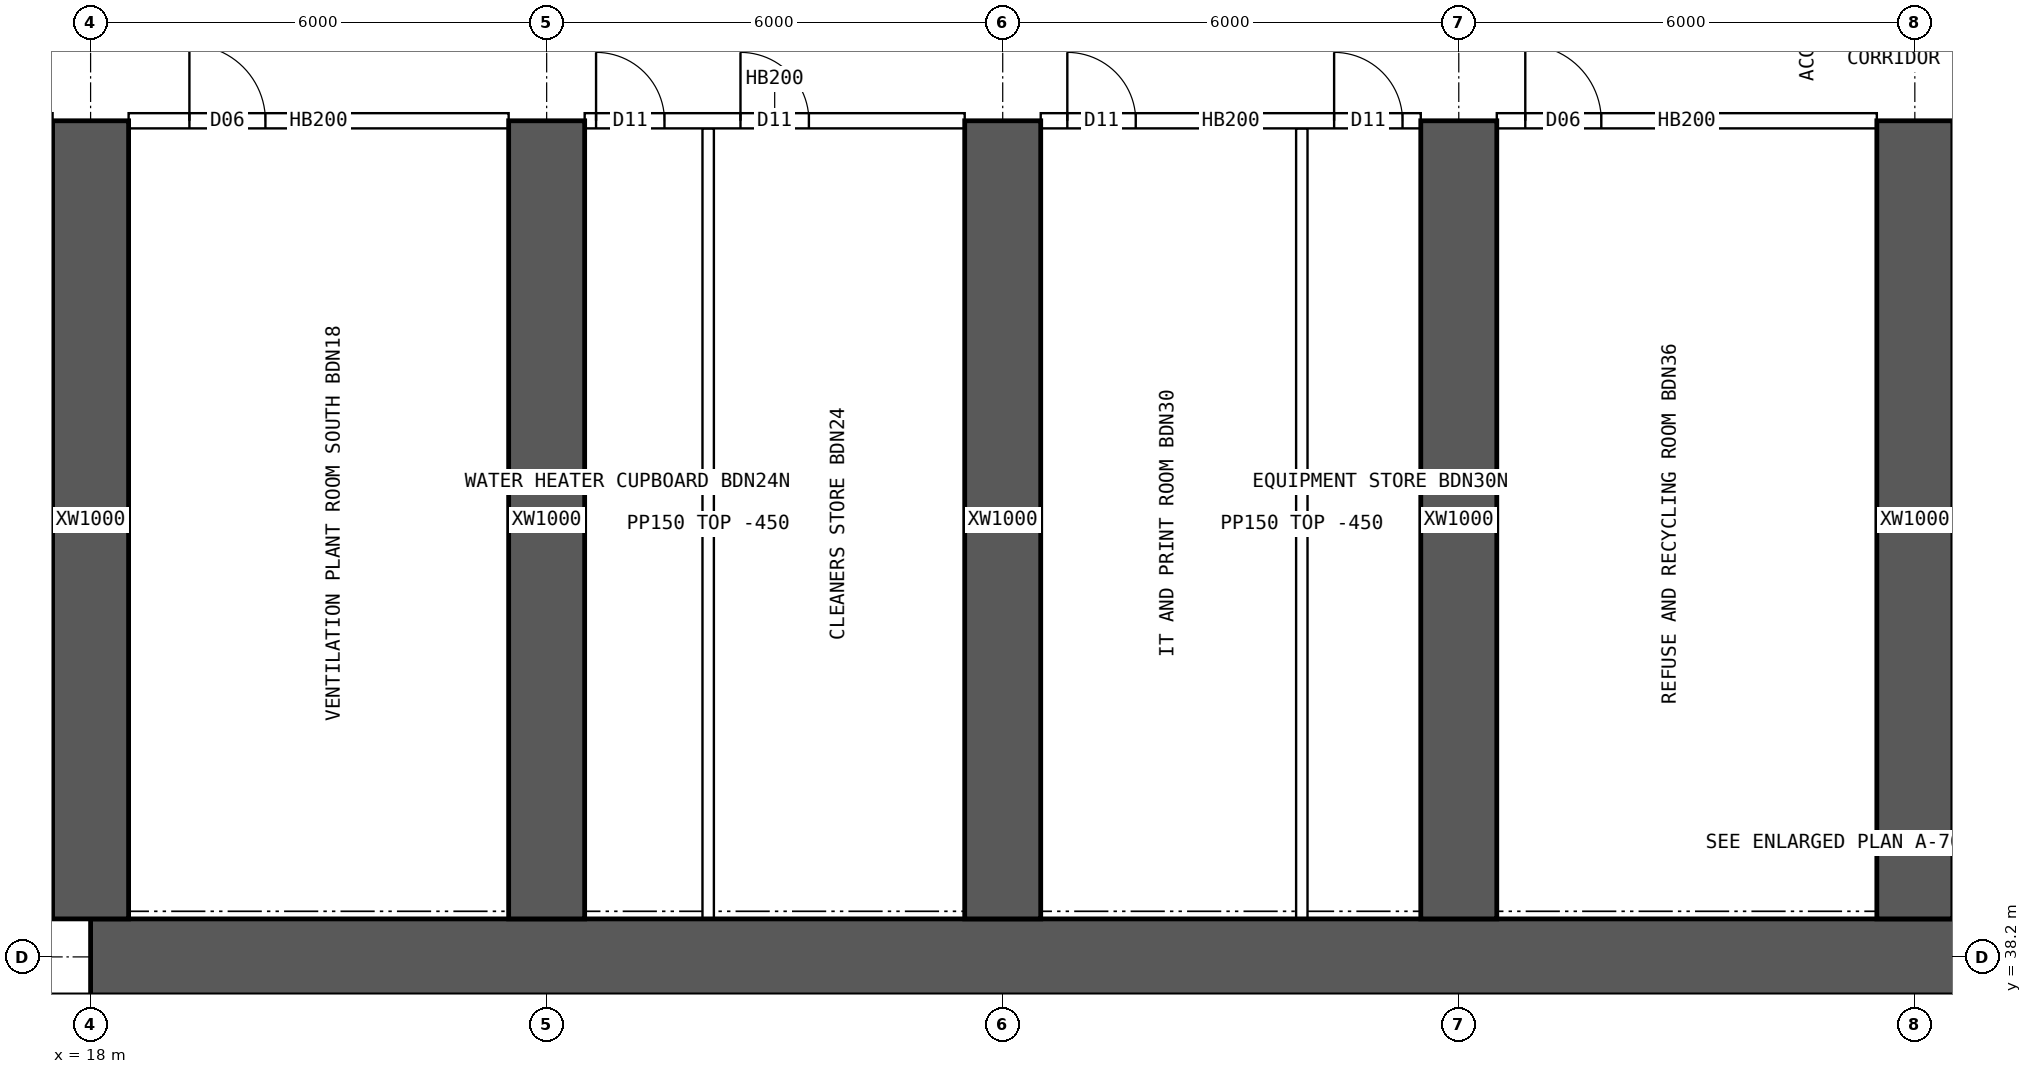
"""IFC4 building model, lengths in metres.
Left out: names, types, materials, properties, quantities, classifications, styles, units other than length and angle.
Written with IfcOpenShell. Run it as: python <this file> out.ifc"""

import sys

from ifc_helpers import new_model, si_unit, direction, frame, frame_2d, origin, place, context, subcontext, project, spatial, rectangle, extrude, element, fill, save


model = new_model("IFC4")
c1 = context("Model", 3, precision=1e-05, world=origin(), true_north=direction((0.0, 1.0)))
c2 = subcontext(c1, "Body", "Model", "MODEL_VIEW")
j1 = project(units=[si_unit("LENGTHUNIT", "METRE"), si_unit("PLANEANGLEUNIT", "RADIAN")], contexts=[c1])
p1 = place(None, origin())
s1 = spatial("IfcSite", under=j1, at=p1, CompositionType="ELEMENT")
p2 = place(p1, origin())
s2 = spatial("IfcBuilding", under=s1, at=p2, CompositionType="ELEMENT")
p3 = place(p2, frame((0.0, 0.0, 20.2)))
s3 = spatial("IfcBuildingStorey", under=s2, at=p3, CompositionType="ELEMENT", Elevation=20.2)
p4 = place(p3, frame((18.0, 38.2, 0.0), z_axis=(0.0, 0.0, 1.0), x_axis=(1.0, 0.0, 0.0)))
e1 = element("IfcWall", 1, at=p4, inside=s3, PredefinedType="SHEAR", context=c2, shape_type="SweptSolid", body=[
    extrude(rectangle(XDim=48.0, YDim=1.0, at=frame_2d((24.0, 0.0))), origin(), (0.0, 0.0, 1.0), 3.75),
])
for number, where, z_axis, x_axis in (
    (2, (21.6, 34.75, 0.0), (0.0, 0.0, 1.0), (0.0, 1.0, 0.0)),
    (3, (26.0, 34.75, 0.0), (0.0, 0.0, 1.0), (0.0, 1.0, 0.0)),
):
    element("IfcWall", number, at=place(p3, frame(where, z_axis=z_axis, x_axis=x_axis)), inside=s3, PredefinedType="SHEAR", context=c2, shape_type="SweptSolid", body=[
        extrude(rectangle(XDim=2.95, YDim=0.3, at=frame_2d((1.475, 0.0))), origin(), (0.0, 0.0, 1.0), 3.75),
    ])
for number, where, z_axis, x_axis in (
    (4, (18.0, 38.7, 0.0), (0.0, 0.0, 1.0), (0.0, 1.0, 0.0)),
    (5, (24.0, 38.7, 0.0), (0.0, 0.0, 1.0), (0.0, 1.0, 0.0)),
    (6, (30.0, 38.7, 0.0), (0.0, 0.0, 1.0), (0.0, 1.0, 0.0)),
    (7, (36.0, 38.7, 0.0), (0.0, 0.0, 1.0), (0.0, 1.0, 0.0)),
    (8, (42.0, 38.7, 0.0), (0.0, 0.0, 1.0), (0.0, 1.0, 0.0)),
):
    element("IfcWall", number, at=place(p3, frame(where, z_axis=z_axis, x_axis=x_axis)), inside=s3, PredefinedType="SHEAR", context=c2, shape_type="SweptSolid", body=[
        extrude(rectangle(XDim=10.5, YDim=1.0, at=frame_2d((5.25, 0.0))), origin(), (0.0, 0.0, 1.0), 3.75),
    ])
for number, where, z_axis, x_axis in (
    (9, (29.651, 34.75, 0.0), (0.0, 0.0, 1.0), (0.0, 1.0, 0.0)),
    (10, (33.946, 34.75, 0.0), (0.0, 0.0, 1.0), (0.0, 1.0, 0.0)),
    (11, (36.946, 34.75, 0.0), (0.0, 0.0, 1.0), (0.0, 1.0, 0.0)),
    (12, (41.463, 34.75, 0.0), (0.0, 0.0, 1.0), (0.0, 1.0, 0.0)),
):
    element("IfcWall", number, at=place(p3, frame(where, z_axis=z_axis, x_axis=x_axis)), inside=s3, PredefinedType="SOLIDWALL", context=c2, shape_type="SweptSolid", body=[
        extrude(rectangle(XDim=2.95, YDim=0.15, at=frame_2d((1.475, 0.0))), origin(), (0.0, 0.0, 1.0), 3.3),
    ])
p5 = place(p3, frame((18.5, 49.2, 0.0), z_axis=(0.0, 0.0, 1.0), x_axis=(1.0, 0.0, 0.0)))
e13 = element("IfcWall", 13, at=p5, inside=s3, PredefinedType="SOLIDWALL", context=c2, shape_type="SweptSolid", body=[
    extrude(rectangle(XDim=5.0, YDim=0.2, at=frame_2d((2.5, 0.0))), origin(), (0.0, 0.0, 1.0), 3.3),
])
p6 = place(p5, frame((0.8, 0.0, 0.0)))
e14 = element("IfcOpeningElement", 14, at=p6, cuts=e13, PredefinedType="OPENING", context=c2, shape_type="SweptSolid", body=[
    extrude(rectangle(XDim=1.0, YDim=2.1, at=frame_2d((0.5, 1.05))), frame((0.0, 0.11, 0.0), z_axis=(0.0, -1.0, 0.0), x_axis=(1.0, 0.0, 0.0)), (0.0, 0.0, 1.0), 0.22),
])
p7 = place(p3, frame((24.5, 49.2, 0.0), z_axis=(0.0, 0.0, 1.0), x_axis=(1.0, 0.0, 0.0)))
e15 = element("IfcWall", 15, at=p7, inside=s3, PredefinedType="SOLIDWALL", context=c2, shape_type="SweptSolid", body=[
    extrude(rectangle(XDim=5.0, YDim=0.2, at=frame_2d((2.5, 0.0))), origin(), (0.0, 0.0, 1.0), 3.3),
])
p8 = place(p7, frame((0.15, 0.0, 0.0)))
e16 = element("IfcOpeningElement", 16, at=p8, cuts=e15, PredefinedType="OPENING", context=c2, shape_type="SweptSolid", body=[
    extrude(rectangle(XDim=0.9, YDim=2.1, at=frame_2d((0.45, 1.05))), frame((0.0, 0.11, 0.0), z_axis=(0.0, -1.0, 0.0), x_axis=(1.0, 0.0, 0.0)), (0.0, 0.0, 1.0), 0.22),
])
p9 = place(p7, frame((2.05, 0.0, 0.0)))
e17 = element("IfcOpeningElement", 17, at=p9, cuts=e15, PredefinedType="OPENING", context=c2, shape_type="SweptSolid", body=[
    extrude(rectangle(XDim=0.9, YDim=2.1, at=frame_2d((0.45, 1.05))), frame((0.0, 0.11, 0.0), z_axis=(0.0, -1.0, 0.0), x_axis=(1.0, 0.0, 0.0)), (0.0, 0.0, 1.0), 0.22),
])
p10 = place(p3, frame((30.5, 49.2, 0.0), z_axis=(0.0, 0.0, 1.0), x_axis=(1.0, 0.0, 0.0)))
e18 = element("IfcWall", 18, at=p10, inside=s3, PredefinedType="SOLIDWALL", context=c2, shape_type="SweptSolid", body=[
    extrude(rectangle(XDim=5.0, YDim=0.2, at=frame_2d((2.5, 0.0))), origin(), (0.0, 0.0, 1.0), 3.3),
])
p11 = place(p10, frame((0.35, 0.0, 0.0)))
e19 = element("IfcOpeningElement", 19, at=p11, cuts=e18, PredefinedType="OPENING", context=c2, shape_type="SweptSolid", body=[
    extrude(rectangle(XDim=0.9, YDim=2.1, at=frame_2d((0.45, 1.05))), frame((0.0, 0.11, 0.0), z_axis=(0.0, -1.0, 0.0), x_axis=(1.0, 0.0, 0.0)), (0.0, 0.0, 1.0), 0.22),
])
p12 = place(p10, frame((3.86, 0.0, 0.0)))
e20 = element("IfcOpeningElement", 20, at=p12, cuts=e18, PredefinedType="OPENING", context=c2, shape_type="SweptSolid", body=[
    extrude(rectangle(XDim=0.9, YDim=2.1, at=frame_2d((0.45, 1.05))), frame((0.0, 0.11, 0.0), z_axis=(0.0, -1.0, 0.0), x_axis=(1.0, 0.0, 0.0)), (0.0, 0.0, 1.0), 0.22),
])
p13 = place(p3, frame((36.5, 49.2, 0.0), z_axis=(0.0, 0.0, 1.0), x_axis=(1.0, 0.0, 0.0)))
e21 = element("IfcWall", 21, at=p13, inside=s3, PredefinedType="SOLIDWALL", context=c2, shape_type="SweptSolid", body=[
    extrude(rectangle(XDim=5.0, YDim=0.2, at=frame_2d((2.5, 0.0))), origin(), (0.0, 0.0, 1.0), 3.3),
])
p14 = place(p13, frame((0.375, 0.0, 0.0)))
e22 = element("IfcOpeningElement", 22, at=p14, cuts=e21, PredefinedType="OPENING", context=c2, shape_type="SweptSolid", body=[
    extrude(rectangle(XDim=1.0, YDim=2.1, at=frame_2d((0.5, 1.05))), frame((0.0, 0.11, 0.0), z_axis=(0.0, -1.0, 0.0), x_axis=(1.0, 0.0, 0.0)), (0.0, 0.0, 1.0), 0.22),
])
for number, where, z_axis, x_axis in (
    (23, (26.125, 38.7, 0.0), (0.0, 0.0, 1.0), (0.0, 1.0, 0.0)),
    (24, (33.935, 38.7, 0.0), (0.0, 0.0, 1.0), (0.0, 1.0, 0.0)),
):
    element("IfcWall", number, at=place(p3, frame(where, z_axis=z_axis, x_axis=x_axis)), inside=s3, PredefinedType="PARTITIONING", context=c2, shape_type="SweptSolid", body=[
        extrude(rectangle(XDim=10.4, YDim=0.15, at=frame_2d((5.2, 0.0))), origin(), (0.0, 0.0, 1.0), 3.3),
    ])
p15 = place(p6, origin())
e25 = element("IfcDoor", 25, at=p15, inside=s3, OperationType="SINGLE_SWING_LEFT", PredefinedType="DOOR", context=c2, shape_type="SweptSolid", body=[
    extrude(rectangle(XDim=1.0, YDim=2.1, at=frame_2d((0.5, 1.05))), frame((0.0, 0.025, 0.0), z_axis=(0.0, -1.0, 0.0), x_axis=(1.0, 0.0, 0.0)), (0.0, 0.0, 1.0), 0.05),
])
fill(e14, e25)
p16 = place(p8, origin())
e26 = element("IfcDoor", 26, at=p16, inside=s3, OperationType="SINGLE_SWING_LEFT", PredefinedType="DOOR", context=c2, shape_type="SweptSolid", body=[
    extrude(rectangle(XDim=0.9, YDim=2.1, at=frame_2d((0.45, 1.05))), frame((0.0, 0.025, 0.0), z_axis=(0.0, -1.0, 0.0), x_axis=(1.0, 0.0, 0.0)), (0.0, 0.0, 1.0), 0.05),
])
fill(e16, e26)
p17 = place(p9, origin())
e27 = element("IfcDoor", 27, at=p17, inside=s3, OperationType="SINGLE_SWING_LEFT", PredefinedType="DOOR", context=c2, shape_type="SweptSolid", body=[
    extrude(rectangle(XDim=0.9, YDim=2.1, at=frame_2d((0.45, 1.05))), frame((0.0, 0.025, 0.0), z_axis=(0.0, -1.0, 0.0), x_axis=(1.0, 0.0, 0.0)), (0.0, 0.0, 1.0), 0.05),
])
fill(e17, e27)
p18 = place(p11, origin())
e28 = element("IfcDoor", 28, at=p18, inside=s3, OperationType="SINGLE_SWING_LEFT", PredefinedType="DOOR", context=c2, shape_type="SweptSolid", body=[
    extrude(rectangle(XDim=0.9, YDim=2.1, at=frame_2d((0.45, 1.05))), frame((0.0, 0.025, 0.0), z_axis=(0.0, -1.0, 0.0), x_axis=(1.0, 0.0, 0.0)), (0.0, 0.0, 1.0), 0.05),
])
fill(e19, e28)
p19 = place(p12, origin())
e29 = element("IfcDoor", 29, at=p19, inside=s3, OperationType="SINGLE_SWING_LEFT", PredefinedType="DOOR", context=c2, shape_type="SweptSolid", body=[
    extrude(rectangle(XDim=0.9, YDim=2.1, at=frame_2d((0.45, 1.05))), frame((0.0, 0.025, 0.0), z_axis=(0.0, -1.0, 0.0), x_axis=(1.0, 0.0, 0.0)), (0.0, 0.0, 1.0), 0.05),
])
fill(e20, e29)
p20 = place(p14, origin())
e30 = element("IfcDoor", 30, at=p20, inside=s3, OperationType="SINGLE_SWING_LEFT", PredefinedType="DOOR", context=c2, shape_type="SweptSolid", body=[
    extrude(rectangle(XDim=1.0, YDim=2.1, at=frame_2d((0.5, 1.05))), frame((0.0, 0.025, 0.0), z_axis=(0.0, -1.0, 0.0), x_axis=(1.0, 0.0, 0.0)), (0.0, 0.0, 1.0), 0.05),
])
fill(e22, e30)
save(model, sys.argv[1])
